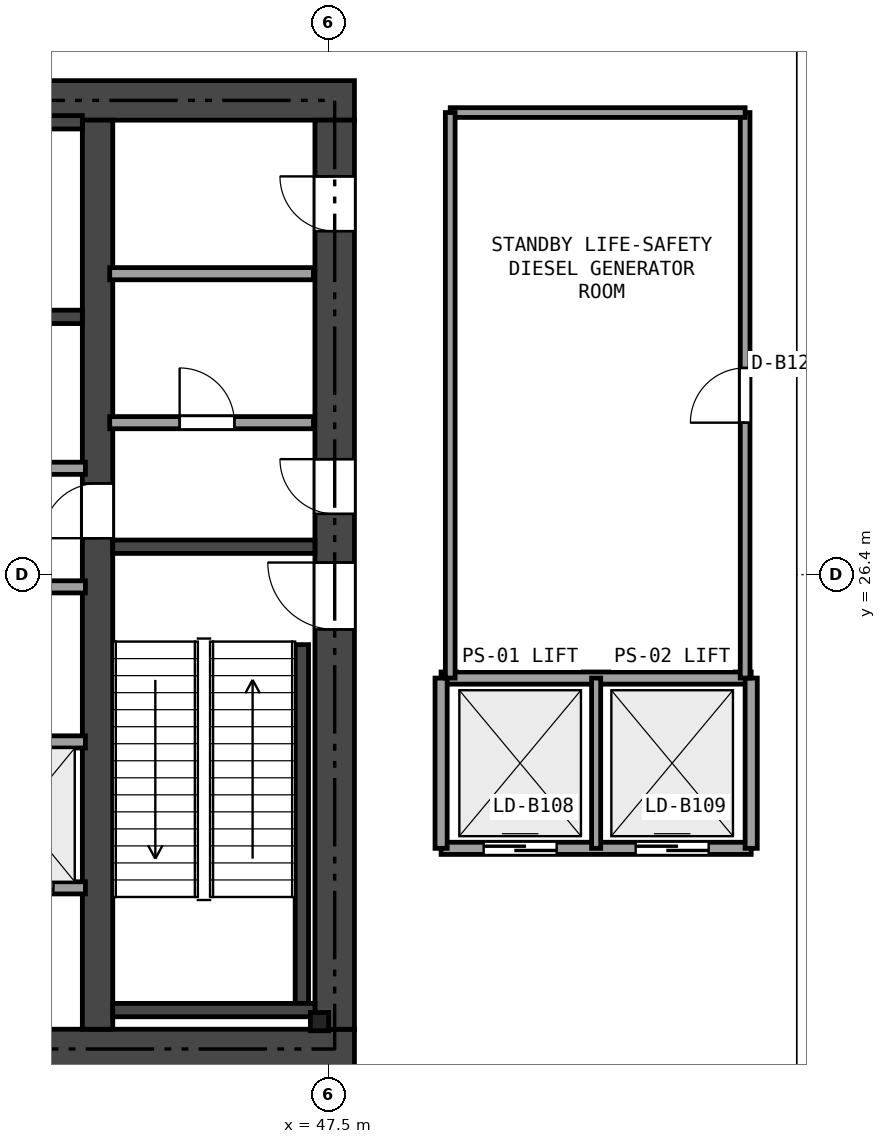
"""IFC4 building model, lengths in metres.
Left out: names, types, materials, properties, quantities, classifications, styles, units other than length and angle.
Written with IfcOpenShell. Run it as: python <this file> out.ifc"""

import sys

from ifc_helpers import new_model, si_unit, direction, frame, frame_2d, origin, origin_2d, place, context, subcontext, project, spatial, rectangle, i_section, extrude, element, fill, save


model = new_model("IFC4")
c1 = context("Model", 3, precision=1e-05, world=origin(), true_north=direction((0.0, 1.0)))
c2 = subcontext(c1, "Body", "Model", "MODEL_VIEW")
j1 = project(units=[si_unit("LENGTHUNIT", "METRE"), si_unit("PLANEANGLEUNIT", "RADIAN")], contexts=[c1])
p1 = place(None, origin())
s1 = spatial("IfcSite", under=j1, at=p1, CompositionType="ELEMENT")
p2 = place(p1, origin())
s2 = spatial("IfcBuilding", under=s1, at=p2, CompositionType="ELEMENT")
p3 = place(p2, frame((0.0, 0.0, -5.4)))
s3 = spatial("IfcBuildingStorey", under=s2, at=p3, CompositionType="ELEMENT", Elevation=-5.4)
p4 = place(p3, frame((26.475, 18.6, 0.0), z_axis=(0.0, 0.0, 1.0), x_axis=(1.0, 0.0, 0.0)))
e1 = element("IfcWall", 1, at=p4, inside=s3, PredefinedType="SHEAR", context=c2, shape_type="SweptSolid", body=[
    extrude(rectangle(XDim=21.45, YDim=0.65, at=frame_2d((10.725, 0.0))), origin(), (0.0, 0.0, 1.0), 5.05),
])
p5 = place(p4, frame((12.45, 0.0, 0.0)))
e2 = element("IfcOpeningElement", 2, at=p5, cuts=e1, PredefinedType="OPENING", context=c2, shape_type="SweptSolid", body=[
    extrude(rectangle(XDim=1.15, YDim=2.15, at=frame_2d((0.575, 1.075))), frame((0.0, 0.335, 0.0), z_axis=(0.0, -1.0, 0.0), x_axis=(1.0, 0.0, 0.0)), (0.0, 0.0, 1.0), 0.67),
])
p6 = place(p4, frame((5.275, 0.0, 0.0)))
e3 = element("IfcOpeningElement", 3, at=p6, cuts=e1, PredefinedType="OPENING", context=c2, shape_type="SweptSolid", body=[
    extrude(rectangle(XDim=0.9, YDim=2.1, at=frame_2d((0.45, 1.05))), frame((0.0, 0.335, 0.0), z_axis=(0.0, -1.0, 0.0), x_axis=(1.0, 0.0, 0.0)), (0.0, 0.0, 1.0), 0.67),
])
p7 = place(p3, frame((26.475, 34.2, 0.0), z_axis=(0.0, 0.0, 1.0), x_axis=(1.0, 0.0, 0.0)))
e4 = element("IfcWall", 4, at=p7, inside=s3, PredefinedType="SHEAR", context=c2, shape_type="SweptSolid", body=[
    extrude(rectangle(XDim=21.45, YDim=0.65, at=frame_2d((10.725, 0.0))), origin(), (0.0, 0.0, 1.0), 5.05),
])
p8 = place(p7, frame((9.725, 0.0, 0.0)))
e5 = element("IfcOpeningElement", 5, at=p8, cuts=e4, PredefinedType="OPENING", context=c2, shape_type="SweptSolid", body=[
    extrude(rectangle(XDim=1.1, YDim=2.15, at=frame_2d((0.55, 1.075))), frame((0.0, 0.335, 0.0), z_axis=(0.0, -1.0, 0.0), x_axis=(1.0, 0.0, 0.0)), (0.0, 0.0, 1.0), 0.67),
])
p9 = place(p7, frame((1.975, 0.0, 0.0)))
e6 = element("IfcOpeningElement", 6, at=p9, cuts=e4, PredefinedType="OPENING", context=c2, shape_type="SweptSolid", body=[
    extrude(rectangle(XDim=0.9, YDim=2.1, at=frame_2d((0.45, 1.05))), frame((0.0, 0.335, 0.0), z_axis=(0.0, -1.0, 0.0), x_axis=(1.0, 0.0, 0.0)), (0.0, 0.0, 1.0), 0.67),
])
p10 = place(p7, frame((6.275, 0.0, 0.0)))
e7 = element("IfcOpeningElement", 7, at=p10, cuts=e4, PredefinedType="OPENING", context=c2, shape_type="SweptSolid", body=[
    extrude(rectangle(XDim=0.9, YDim=2.1, at=frame_2d((0.45, 1.05))), frame((0.0, 0.335, 0.0), z_axis=(0.0, -1.0, 0.0), x_axis=(1.0, 0.0, 0.0)), (0.0, 0.0, 1.0), 0.67),
])
p11 = place(p3, frame((47.6, 18.925, 0.0), z_axis=(0.0, 0.0, 1.0), x_axis=(0.0, 1.0, 0.0)))
e8 = element("IfcWall", 8, at=p11, inside=s3, PredefinedType="SHEAR", context=c2, shape_type="SweptSolid", body=[
    extrude(rectangle(XDim=14.95, YDim=0.65, at=frame_2d((7.475, 0.0))), origin(), (0.0, 0.0, 1.0), 5.05),
])
p12 = place(p11, frame((6.575, 0.0, 0.0)))
e9 = element("IfcOpeningElement", 9, at=p12, cuts=e8, PredefinedType="OPENING", context=c2, shape_type="SweptSolid", body=[
    extrude(rectangle(XDim=1.1, YDim=2.15, at=frame_2d((0.55, 1.075))), frame((0.0, 0.335, 0.0), z_axis=(0.0, -1.0, 0.0), x_axis=(1.0, 0.0, 0.0)), (0.0, 0.0, 1.0), 0.67),
])
p13 = place(p11, frame((8.475, 0.0, 0.0)))
e10 = element("IfcOpeningElement", 10, at=p13, cuts=e8, PredefinedType="OPENING", context=c2, shape_type="SweptSolid", body=[
    extrude(rectangle(XDim=0.9, YDim=2.1, at=frame_2d((0.45, 1.05))), frame((0.0, 0.335, 0.0), z_axis=(0.0, -1.0, 0.0), x_axis=(1.0, 0.0, 0.0)), (0.0, 0.0, 1.0), 0.67),
])
p14 = place(p11, frame((13.125, 0.0, 0.0)))
e11 = element("IfcOpeningElement", 11, at=p14, cuts=e8, PredefinedType="OPENING", context=c2, shape_type="SweptSolid", body=[
    extrude(rectangle(XDim=0.9, YDim=2.1, at=frame_2d((0.45, 1.05))), frame((0.0, 0.335, 0.0), z_axis=(0.0, -1.0, 0.0), x_axis=(1.0, 0.0, 0.0)), (0.0, 0.0, 1.0), 0.67),
])
p15 = place(p3, frame((43.7, 18.925, 0.0), z_axis=(0.0, 0.0, 1.0), x_axis=(0.0, 1.0, 0.0)))
e12 = element("IfcWall", 12, at=p15, inside=s3, PredefinedType="SHEAR", context=c2, shape_type="SweptSolid", body=[
    extrude(rectangle(XDim=14.95, YDim=0.5, at=frame_2d((7.475, 0.0))), origin(), (0.0, 0.0, 1.0), 5.05),
])
p16 = place(p15, frame((8.075, 0.0, 0.0)))
e13 = element("IfcOpeningElement", 13, at=p16, cuts=e12, PredefinedType="OPENING", context=c2, shape_type="SweptSolid", body=[
    extrude(rectangle(XDim=0.9, YDim=2.1, at=frame_2d((0.45, 1.05))), frame((0.0, 0.26, 0.0), z_axis=(0.0, -1.0, 0.0), x_axis=(1.0, 0.0, 0.0)), (0.0, 0.0, 1.0), 0.52),
])
p17 = place(p3, frame((43.95, 26.86, 0.0), z_axis=(0.0, 0.0, 1.0), x_axis=(1.0, 0.0, 0.0)))
e14 = element("IfcWall", 14, at=p17, inside=s3, PredefinedType="SHEAR", context=c2, shape_type="SweptSolid", body=[
    extrude(rectangle(XDim=3.325, YDim=0.22, at=frame_2d((1.663, 0.0))), origin(), (0.0, 0.0, 1.0), 5.05),
])
p18 = place(p3, frame((47.06, 19.35, 0.0), z_axis=(0.0, 0.0, 1.0), x_axis=(0.0, 1.0, 0.0)))
e15 = element("IfcWall", 15, at=p18, inside=s3, PredefinedType="SHEAR", context=c2, shape_type="SweptSolid", body=[
    extrude(rectangle(XDim=5.9, YDim=0.22, at=frame_2d((2.95, 0.0))), origin(), (0.0, 0.0, 1.0), 5.05),
])
p19 = place(p3, frame((43.95, 19.24, 0.0), z_axis=(0.0, 0.0, 1.0), x_axis=(1.0, 0.0, 0.0)))
e16 = element("IfcWall", 16, at=p19, inside=s3, PredefinedType="SHEAR", context=c2, shape_type="SweptSolid", body=[
    extrude(rectangle(XDim=3.325, YDim=0.22, at=frame_2d((1.663, 0.0))), origin(), (0.0, 0.0, 1.0), 5.05),
])
p20 = place(p3, frame((35.84, 30.64, 0.0), z_axis=(0.0, 0.0, 1.0), x_axis=(1.0, 0.0, 0.0)))
e17 = element("IfcWall", 17, at=p20, inside=s3, PredefinedType="SHEAR", context=c2, shape_type="SweptSolid", body=[
    extrude(rectangle(XDim=7.61, YDim=0.22, at=frame_2d((3.805, 0.0))), origin(), (0.0, 0.0, 1.0), 5.05),
])
p21 = place(p3, frame((37.55, 33.84, 0.0), z_axis=(0.0, 0.0, 1.0), x_axis=(1.0, 0.0, 0.0)))
e18 = element("IfcWall", 18, at=p21, inside=s3, PredefinedType="SHEAR", context=c2, shape_type="SweptSolid", body=[
    extrude(rectangle(XDim=5.9, YDim=0.22, at=frame_2d((2.95, 0.0))), origin(), (0.0, 0.0, 1.0), 5.05),
])
p22 = place(p3, frame((47.35, 19.05, 0.0), z_axis=(0.0, 0.0, 1.0), x_axis=(1.0, 0.0, 0.0)))
e19 = element("IfcColumn", 19, at=p22, inside=s3, PredefinedType="PILASTER", context=c2, shape_type="SweptSolid", body=[
    extrude(i_section(OverallWidth=0.3, OverallDepth=0.3, WebThickness=0.011, FlangeThickness=0.019, at=origin_2d()), origin(), (0.0, 0.0, 1.0), 5.05),
])
p23 = place(p3, frame((43.9, 28.9, 0.0), z_axis=(0.0, 0.0, 1.0), x_axis=(1.0, 0.0, 0.0)))
e20 = element("IfcWall", 20, at=p23, inside=s3, PredefinedType="SOLIDWALL", context=c2, shape_type="SweptSolid", body=[
    extrude(rectangle(XDim=3.35, YDim=0.2, at=frame_2d((1.675, 0.0))), origin(), (0.0, 0.0, 1.0), 5.05),
])
p24 = place(p23, frame((1.15, 0.0, 0.0)))
e21 = element("IfcOpeningElement", 21, at=p24, cuts=e20, PredefinedType="OPENING", context=c2, shape_type="SweptSolid", body=[
    extrude(rectangle(XDim=0.9, YDim=2.1, at=frame_2d((0.45, 1.05))), frame((0.0, 0.11, 0.0), z_axis=(0.0, -1.0, 0.0), x_axis=(1.0, 0.0, 0.0)), (0.0, 0.0, 1.0), 0.22),
])
p25 = place(p3, frame((43.9, 31.35, 0.0), z_axis=(0.0, 0.0, 1.0), x_axis=(1.0, 0.0, 0.0)))
e22 = element("IfcWall", 22, at=p25, inside=s3, PredefinedType="SOLIDWALL", context=c2, shape_type="SweptSolid", body=[
    extrude(rectangle(XDim=3.35, YDim=0.2, at=frame_2d((1.675, 0.0))), origin(), (0.0, 0.0, 1.0), 5.05),
])
for number, where, z_axis, x_axis in (
    (23, (35.62, 28.15, 0.0), (0.0, 0.0, 1.0), (1.0, 0.0, 0.0)),
    (24, (35.62, 26.2, 0.0), (0.0, 0.0, 1.0), (1.0, 0.0, 0.0)),
):
    element("IfcWall", number, at=place(p3, frame(where, z_axis=z_axis, x_axis=x_axis)), inside=s3, PredefinedType="SOLIDWALL", context=c2, shape_type="SweptSolid", body=[
        extrude(rectangle(XDim=7.88, YDim=0.2, at=frame_2d((3.94, 0.0))), origin(), (0.0, 0.0, 1.0), 5.05),
    ])
p26 = place(p3, frame((35.62, 23.65, 0.0), z_axis=(0.0, 0.0, 1.0), x_axis=(1.0, 0.0, 0.0)))
e25 = element("IfcWall", 25, at=p26, inside=s3, PredefinedType="SOLIDWALL", context=c2, shape_type="SweptSolid", body=[
    extrude(rectangle(XDim=7.88, YDim=0.2, at=frame_2d((3.94, 0.0))), origin(), (0.0, 0.0, 1.0), 4.571),
])
p27 = place(p3, frame((35.62, 21.25, 0.0), z_axis=(0.0, 0.0, 1.0), x_axis=(1.0, 0.0, 0.0)))
e26 = element("IfcWall", 26, at=p27, inside=s3, PredefinedType="SOLIDWALL", context=c2, shape_type="SweptSolid", body=[
    extrude(rectangle(XDim=7.88, YDim=0.2, at=frame_2d((3.94, 0.0))), origin(), (0.0, 0.0, 1.0), 5.05),
])
p28 = place(p27, frame((0.405, 0.0, 0.0)))
e27 = element("IfcOpeningElement", 27, at=p28, cuts=e26, PredefinedType="OPENING", context=c2, shape_type="SweptSolid", body=[
    extrude(rectangle(XDim=1.1, YDim=2.15, at=frame_2d((0.55, 1.075))), frame((0.0, 0.11, 0.0), z_axis=(0.0, -1.0, 0.0), x_axis=(1.0, 0.0, 0.0)), (0.0, 0.0, 1.0), 0.22),
])
p29 = place(p27, frame((2.355, 0.0, 0.0)))
e28 = element("IfcOpeningElement", 28, at=p29, cuts=e26, PredefinedType="OPENING", context=c2, shape_type="SweptSolid", body=[
    extrude(rectangle(XDim=1.1, YDim=2.15, at=frame_2d((0.55, 1.075))), frame((0.0, 0.11, 0.0), z_axis=(0.0, -1.0, 0.0), x_axis=(1.0, 0.0, 0.0)), (0.0, 0.0, 1.0), 0.22),
])
p30 = place(p27, frame((4.305, 0.0, 0.0)))
e29 = element("IfcOpeningElement", 29, at=p30, cuts=e26, PredefinedType="OPENING", context=c2, shape_type="SweptSolid", body=[
    extrude(rectangle(XDim=1.1, YDim=2.15, at=frame_2d((0.55, 1.075))), frame((0.0, 0.11, 0.0), z_axis=(0.0, -1.0, 0.0), x_axis=(1.0, 0.0, 0.0)), (0.0, 0.0, 1.0), 0.22),
])
p31 = place(p27, frame((6.255, 0.0, 0.0)))
e30 = element("IfcOpeningElement", 30, at=p31, cuts=e26, PredefinedType="OPENING", context=c2, shape_type="SweptSolid", body=[
    extrude(rectangle(XDim=1.1, YDim=2.15, at=frame_2d((0.55, 1.075))), frame((0.0, 0.11, 0.0), z_axis=(0.0, -1.0, 0.0), x_axis=(1.0, 0.0, 0.0)), (0.0, 0.0, 1.0), 0.22),
])
p32 = place(p3, frame((49.35, 24.7, 0.0), z_axis=(0.0, 0.0, 1.0), x_axis=(1.0, 0.0, 0.0)))
e31 = element("IfcWall", 31, at=p32, inside=s3, PredefinedType="SOLIDWALL", context=c2, shape_type="SweptSolid", body=[
    extrude(rectangle(XDim=5.1, YDim=0.2, at=frame_2d((2.55, 0.0))), origin(), (0.0, 0.0, 1.0), 5.05),
])
p33 = place(p3, frame((49.35, 21.9, 0.0), z_axis=(0.0, 0.0, 1.0), x_axis=(1.0, 0.0, 0.0)))
e32 = element("IfcWall", 32, at=p33, inside=s3, PredefinedType="SOLIDWALL", context=c2, shape_type="SweptSolid", body=[
    extrude(rectangle(XDim=5.1, YDim=0.2, at=frame_2d((2.55, 0.0))), origin(), (0.0, 0.0, 1.0), 5.05),
])
p34 = place(p33, frame((0.7, 0.0, 0.0)))
e33 = element("IfcOpeningElement", 33, at=p34, cuts=e32, PredefinedType="OPENING", context=c2, shape_type="SweptSolid", body=[
    extrude(rectangle(XDim=1.2, YDim=2.15, at=frame_2d((0.6, 1.075))), frame((0.0, 0.11, 0.0), z_axis=(0.0, -1.0, 0.0), x_axis=(1.0, 0.0, 0.0)), (0.0, 0.0, 1.0), 0.22),
])
p35 = place(p33, frame((3.2, 0.0, 0.0)))
e34 = element("IfcOpeningElement", 34, at=p35, cuts=e32, PredefinedType="OPENING", context=c2, shape_type="SweptSolid", body=[
    extrude(rectangle(XDim=1.2, YDim=2.15, at=frame_2d((0.6, 1.075))), frame((0.0, 0.11, 0.0), z_axis=(0.0, -1.0, 0.0), x_axis=(1.0, 0.0, 0.0)), (0.0, 0.0, 1.0), 0.22),
])
for number, where, z_axis, x_axis in (
    (35, (49.35, 21.9, 0.0), (0.0, 0.0, 1.0), (0.0, 1.0, 0.0)),
    (36, (54.45, 21.9, 0.0), (0.0, 0.0, 1.0), (0.0, 1.0, 0.0)),
):
    element("IfcWall", number, at=place(p3, frame(where, z_axis=z_axis, x_axis=x_axis)), inside=s3, PredefinedType="SOLIDWALL", context=c2, shape_type="SweptSolid", body=[
        extrude(rectangle(XDim=2.8, YDim=0.2, at=frame_2d((1.4, 0.0))), origin(), (0.0, 0.0, 1.0), 5.05),
    ])
p36 = place(p3, frame((51.9, 21.9, 0.0), z_axis=(0.0, 0.0, 1.0), x_axis=(0.0, 1.0, 0.0)))
e37 = element("IfcWall", 37, at=p36, inside=s3, PredefinedType="PARTITIONING", context=c2, shape_type="SweptSolid", body=[
    extrude(rectangle(XDim=2.8, YDim=0.15, at=frame_2d((1.4, 0.0))), origin(), (0.0, 0.0, 1.0), 5.05),
])
p37 = place(p3, frame((54.35, 24.7, 0.0), z_axis=(0.0, 0.0, 1.0), x_axis=(0.0, 1.0, 0.0)))
e38 = element("IfcWall", 38, at=p37, inside=s3, PredefinedType="PARTITIONING", context=c2, shape_type="SweptSolid", body=[
    extrude(rectangle(XDim=9.3, YDim=0.16, at=frame_2d((4.65, 0.0))), origin(), (0.0, 0.0, 1.0), 5.05),
])
p38 = place(p37, frame((4.2, 0.0, 0.0)))
e39 = element("IfcOpeningElement", 39, at=p38, cuts=e38, PredefinedType="OPENING", context=c2, shape_type="SweptSolid", body=[
    extrude(rectangle(XDim=0.9, YDim=2.0, at=frame_2d((0.45, 1.0))), frame((0.0, 0.09, 0.0), z_axis=(0.0, -1.0, 0.0), x_axis=(1.0, 0.0, 0.0)), (0.0, 0.0, 1.0), 0.18),
])
p39 = place(p3, frame((54.35, 34.0, 0.0), z_axis=(0.0, 0.0, 1.0), x_axis=(-1.0, 0.0, 0.0)))
e40 = element("IfcWall", 40, at=p39, inside=s3, PredefinedType="PARTITIONING", context=c2, shape_type="SweptSolid", body=[
    extrude(rectangle(XDim=4.85, YDim=0.16, at=frame_2d((2.425, 0.0))), origin(), (0.0, 0.0, 1.0), 5.05),
])
p40 = place(p3, frame((49.5, 34.0, 0.0), z_axis=(0.0, 0.0, 1.0), x_axis=(0.0, -1.0, 0.0)))
e41 = element("IfcWall", 41, at=p40, inside=s3, PredefinedType="PARTITIONING", context=c2, shape_type="SweptSolid", body=[
    extrude(rectangle(XDim=9.3, YDim=0.16, at=frame_2d((4.65, 0.0))), origin(), (0.0, 0.0, 1.0), 5.05),
])
p41 = place(p12, origin())
e42 = element("IfcDoor", 42, at=p41, inside=s3, OperationType="SINGLE_SWING_RIGHT", PredefinedType="DOOR", context=c2, shape_type="SweptSolid", body=[
    extrude(rectangle(XDim=1.1, YDim=2.15, at=frame_2d((0.55, 1.075))), frame((0.0, 0.025, 0.0), z_axis=(0.0, -1.0, 0.0), x_axis=(1.0, 0.0, 0.0)), (0.0, 0.0, 1.0), 0.05),
])
fill(e9, e42)
p42 = place(p16, origin())
e43 = element("IfcDoor", 43, at=p42, inside=s3, OperationType="SINGLE_SWING_LEFT", PredefinedType="DOOR", context=c2, shape_type="SweptSolid", body=[
    extrude(rectangle(XDim=0.9, YDim=2.1, at=frame_2d((0.45, 1.05))), frame((0.0, 0.025, 0.0), z_axis=(0.0, -1.0, 0.0), x_axis=(1.0, 0.0, 0.0)), (0.0, 0.0, 1.0), 0.05),
])
fill(e13, e43)
p43 = place(p13, origin())
e44 = element("IfcDoor", 44, at=p43, inside=s3, OperationType="SINGLE_SWING_RIGHT", PredefinedType="DOOR", context=c2, shape_type="SweptSolid", body=[
    extrude(rectangle(XDim=0.9, YDim=2.1, at=frame_2d((0.45, 1.05))), frame((0.0, 0.025, 0.0), z_axis=(0.0, -1.0, 0.0), x_axis=(1.0, 0.0, 0.0)), (0.0, 0.0, 1.0), 0.05),
])
fill(e10, e44)
p44 = place(p24, origin())
e45 = element("IfcDoor", 45, at=p44, inside=s3, OperationType="SINGLE_SWING_LEFT", PredefinedType="DOOR", context=c2, shape_type="SweptSolid", body=[
    extrude(rectangle(XDim=0.9, YDim=2.1, at=frame_2d((0.45, 1.05))), frame((0.0, 0.025, 0.0), z_axis=(0.0, -1.0, 0.0), x_axis=(1.0, 0.0, 0.0)), (0.0, 0.0, 1.0), 0.05),
])
fill(e21, e45)
p45 = place(p14, origin())
e46 = element("IfcDoor", 46, at=p45, inside=s3, OperationType="SINGLE_SWING_RIGHT", PredefinedType="DOOR", context=c2, shape_type="SweptSolid", body=[
    extrude(rectangle(XDim=0.9, YDim=2.1, at=frame_2d((0.45, 1.05))), frame((0.0, 0.025, 0.0), z_axis=(0.0, -1.0, 0.0), x_axis=(1.0, 0.0, 0.0)), (0.0, 0.0, 1.0), 0.05),
])
fill(e11, e46)
p46 = place(p31, origin())
e47 = element("IfcDoor", 47, at=p46, inside=s3, OperationType="SLIDING_TO_LEFT", PredefinedType="DOOR", context=c2, shape_type="SweptSolid", body=[
    extrude(rectangle(XDim=1.1, YDim=2.15, at=frame_2d((0.55, 1.075))), frame((0.0, 0.025, 0.0), z_axis=(0.0, -1.0, 0.0), x_axis=(1.0, 0.0, 0.0)), (0.0, 0.0, 1.0), 0.05),
])
fill(e30, e47)
p47 = place(p34, origin())
e48 = element("IfcDoor", 48, at=p47, inside=s3, OperationType="SLIDING_TO_LEFT", PredefinedType="DOOR", context=c2, shape_type="SweptSolid", body=[
    extrude(rectangle(XDim=1.2, YDim=2.15, at=frame_2d((0.6, 1.075))), frame((0.0, 0.025, 0.0), z_axis=(0.0, -1.0, 0.0), x_axis=(1.0, 0.0, 0.0)), (0.0, 0.0, 1.0), 0.05),
])
fill(e33, e48)
p48 = place(p35, origin())
e49 = element("IfcDoor", 49, at=p48, inside=s3, OperationType="SLIDING_TO_LEFT", PredefinedType="DOOR", context=c2, shape_type="SweptSolid", body=[
    extrude(rectangle(XDim=1.2, YDim=2.15, at=frame_2d((0.6, 1.075))), frame((0.0, 0.025, 0.0), z_axis=(0.0, -1.0, 0.0), x_axis=(1.0, 0.0, 0.0)), (0.0, 0.0, 1.0), 0.05),
])
fill(e34, e49)
p49 = place(p38, origin())
e50 = element("IfcDoor", 50, at=p49, inside=s3, OperationType="SINGLE_SWING_LEFT", PredefinedType="DOOR", context=c2, shape_type="SweptSolid", body=[
    extrude(rectangle(XDim=0.9, YDim=2.0, at=frame_2d((0.45, 1.0))), frame((0.0, 0.025, 0.0), z_axis=(0.0, -1.0, 0.0), x_axis=(1.0, 0.0, 0.0)), (0.0, 0.0, 1.0), 0.05),
])
fill(e39, e50)
save(model, sys.argv[1])
